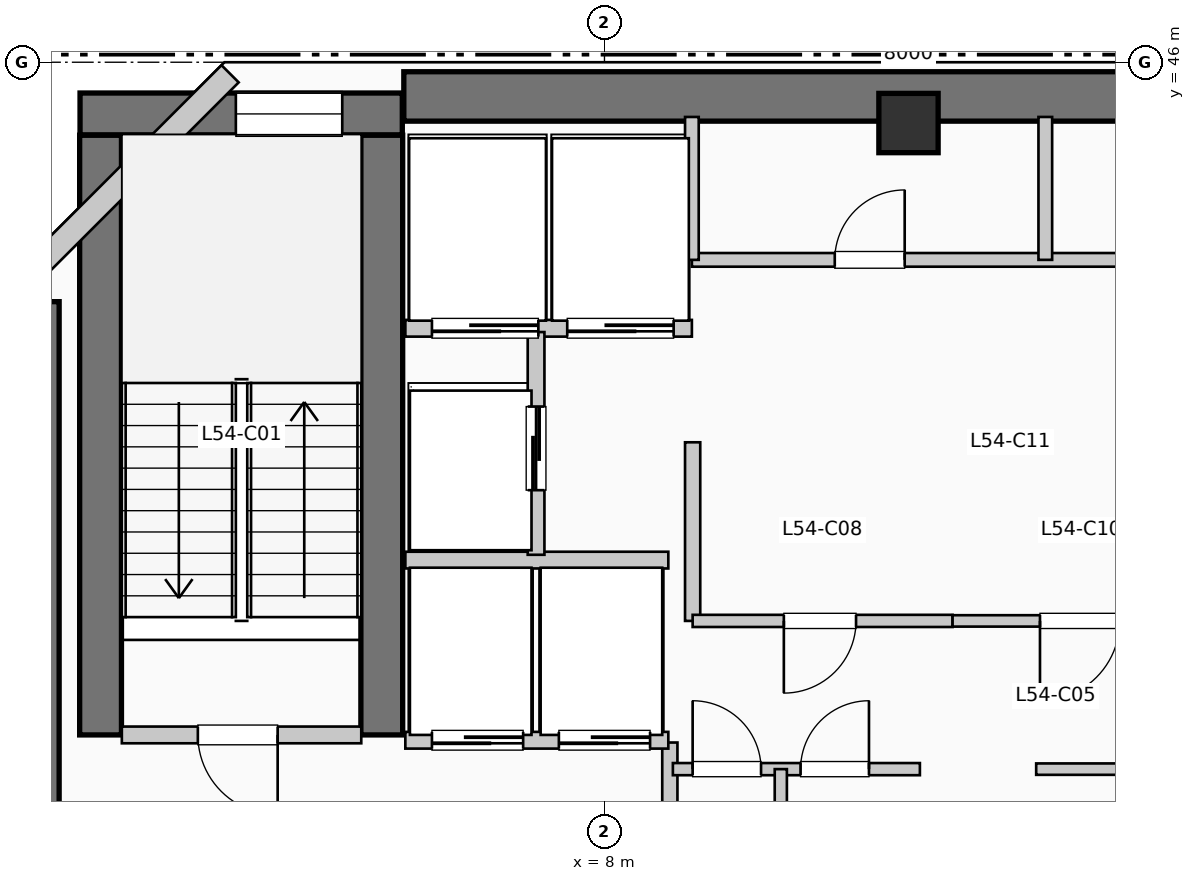
"""IFC4 building model, lengths in metres.
Left out: names, types, materials, properties, quantities, classifications, styles, units other than length and angle.
Written with IfcOpenShell. Run it as: python <this file> out.ifc"""

import sys

from ifc_helpers import new_model, si_unit, direction, frame, frame_2d, origin, origin_2d, place, context, subcontext, project, spatial, rectangle, extrude, element, fill, save


model = new_model("IFC4")
c1 = context("Model", 3, precision=1e-05, world=origin(), true_north=direction((0.0, 1.0)))
c2 = subcontext(c1, "Body", "Model", "MODEL_VIEW")
j1 = project(units=[si_unit("LENGTHUNIT", "METRE"), si_unit("PLANEANGLEUNIT", "RADIAN")], contexts=[c1])
p1 = place(None, origin())
s1 = spatial("IfcSite", under=j1, at=p1, CompositionType="ELEMENT")
p2 = place(p1, origin())
s2 = spatial("IfcBuilding", under=s1, at=p2, CompositionType="ELEMENT")
p3 = place(p2, frame((0.0, 0.0, 223.74)))
s3 = spatial("IfcBuildingStorey", under=s2, at=p3, CompositionType="ELEMENT", Elevation=223.74)
p4 = place(p3, frame((5.36, 45.55, 0.0), z_axis=(0.0, 0.0, 1.0), x_axis=(1.0, 0.0, 0.0)))
e1 = element("IfcWall", 1, at=p4, inside=s3, PredefinedType="SHEAR", context=c2, shape_type="SweptSolid", body=[
    extrude(rectangle(XDim=13.98, YDim=0.65, at=frame_2d((6.99, 0.0))), origin(), (0.0, 0.0, 1.0), 3.96),
])
p5 = place(p3, frame((0.5, 34.95, 0.0), z_axis=(0.0, 0.0, 1.0), x_axis=(0.0, 1.0, 0.0)))
e2 = element("IfcWall", 2, at=p5, inside=s3, PredefinedType="SHEAR", context=c2, shape_type="SweptSolid", body=[
    extrude(rectangle(XDim=7.9, YDim=0.65, at=frame_2d((3.95, 0.0))), origin(), (0.0, 0.0, 1.0), 3.96),
])
for number, where, z_axis, x_axis in (
    (3, (1.37, 37.15, 0.0), (0.0, 0.0, 1.0), (0.0, 1.0, 0.0)),
    (4, (5.07, 37.15, 0.0), (0.0, 0.0, 1.0), (0.0, 1.0, 0.0)),
):
    element("IfcWall", number, at=place(p3, frame(where, z_axis=z_axis, x_axis=x_axis)), inside=s3, PredefinedType="SHEAR", context=c2, shape_type="SweptSolid", body=[
        extrude(rectangle(XDim=7.89, YDim=0.55, at=frame_2d((3.945, 0.0))), origin(), (0.0, 0.0, 1.0), 3.96),
    ])
p6 = place(p3, frame((1.1, 45.32, 0.0), z_axis=(0.0, 0.0, 1.0), x_axis=(1.0, 0.0, 0.0)))
e5 = element("IfcWall", 5, at=p6, inside=s3, PredefinedType="SHEAR", context=c2, shape_type="SweptSolid", body=[
    extrude(rectangle(XDim=4.24, YDim=0.55, at=frame_2d((2.12, 0.0))), origin(), (0.0, 0.0, 1.0), 3.96),
])
p7 = place(p6, frame((2.05, 0.0, 1.05)))
e6 = element("IfcOpeningElement", 6, at=p7, cuts=e5, PredefinedType="OPENING", context=c2, shape_type="SweptSolid", body=[
    extrude(rectangle(XDim=1.4, YDim=1.8, at=frame_2d((0.7, 0.9))), frame((0.0, 0.285, 0.0), z_axis=(0.0, -1.0, 0.0), x_axis=(1.0, 0.0, 0.0)), (0.0, 0.0, 1.0), 0.57),
])
p8 = place(p3, frame((12.0, 45.2, 0.0), z_axis=(0.0, 0.0, 1.0), x_axis=(1.0, 0.0, 0.0)))
e7 = element("IfcColumn", 7, at=p8, inside=s3, PredefinedType="COLUMN", context=c2, shape_type="SweptSolid", body=[
    extrude(rectangle(XDim=0.78, YDim=0.78, at=origin_2d()), origin(), (0.0, 0.0, 1.0), 3.96),
])
p9 = place(p3, frame((3.074, 45.848, 0.0), z_axis=(0.0, 0.0, 1.0), x_axis=(-0.707106781187, -0.707106781187, 0.0)))
e8 = element("IfcWall", 8, at=p9, inside=s3, PredefinedType="SOLIDWALL", context=c2, shape_type="SweptSolid", body=[
    extrude(rectangle(XDim=4.133, YDim=0.32, at=frame_2d((2.066, 0.0))), origin(), (0.0, 0.0, 1.0), 3.71),
])
p10 = place(p3, frame((1.65, 37.15, 0.0), z_axis=(0.0, 0.0, 1.0), x_axis=(1.0, 0.0, 0.0)))
e9 = element("IfcWall", 9, at=p10, inside=s3, PredefinedType="PARTITIONING", context=c2, shape_type="SweptSolid", body=[
    extrude(rectangle(XDim=3.15, YDim=0.22, at=frame_2d((1.575, 0.0))), origin(), (0.0, 0.0, 1.0), 3.71),
])
p11 = place(p10, frame((2.05, 0.0, 0.0), z_axis=(0.0, 0.0, 1.0), x_axis=(-1.0, 0.0, 0.0)))
e10 = element("IfcOpeningElement", 10, at=p11, cuts=e9, PredefinedType="OPENING", context=c2, shape_type="SweptSolid", body=[
    extrude(rectangle(XDim=1.05, YDim=2.15, at=frame_2d((0.525, 1.075))), frame((0.0, 0.12, 0.0), z_axis=(0.0, -1.0, 0.0), x_axis=(1.0, 0.0, 0.0)), (0.0, 0.0, 1.0), 0.24),
])
p12 = place(p3, frame((8.86, 34.55, 0.0), z_axis=(0.0, 0.0, 1.0), x_axis=(0.0, 1.0, 0.0)))
e11 = element("IfcWall", 11, at=p12, inside=s3, PredefinedType="PARTITIONING", context=c2, shape_type="SweptSolid", body=[
    extrude(rectangle(XDim=2.5, YDim=0.2, at=frame_2d((1.25, 0.0))), origin(), (0.0, 0.0, 1.0), 3.71),
])
p13 = place(p3, frame((5.38, 37.08, 0.0), z_axis=(0.0, 0.0, 1.0), x_axis=(1.0, 0.0, 0.0)))
e12 = element("IfcWall", 12, at=p13, inside=s3, PredefinedType="PARTITIONING", context=c2, shape_type="SweptSolid", body=[
    extrude(rectangle(XDim=3.46, YDim=0.22, at=frame_2d((1.73, 0.0))), origin(), (0.0, 0.0, 1.0), 3.71),
])
p14 = place(p13, frame((1.55, 0.0, 0.0), z_axis=(0.0, 0.0, 1.0), x_axis=(-1.0, 0.0, 0.0)))
e13 = element("IfcOpeningElement", 13, at=p14, cuts=e12, PredefinedType="OPENING", context=c2, shape_type="SweptSolid", body=[
    extrude(rectangle(XDim=1.2, YDim=2.2, at=frame_2d((0.6, 1.1))), frame((0.0, 0.12, 0.0), z_axis=(0.0, -1.0, 0.0), x_axis=(1.0, 0.0, 0.0)), (0.0, 0.0, 1.0), 0.24),
])
p15 = place(p13, frame((3.22, 0.0, 0.0), z_axis=(0.0, 0.0, 1.0), x_axis=(-1.0, 0.0, 0.0)))
e14 = element("IfcOpeningElement", 14, at=p15, cuts=e12, PredefinedType="OPENING", context=c2, shape_type="SweptSolid", body=[
    extrude(rectangle(XDim=1.2, YDim=2.2, at=frame_2d((0.6, 1.1))), frame((0.0, 0.12, 0.0), z_axis=(0.0, -1.0, 0.0), x_axis=(1.0, 0.0, 0.0)), (0.0, 0.0, 1.0), 0.24),
])
p16 = place(p3, frame((5.38, 39.45, 0.0), z_axis=(0.0, 0.0, 1.0), x_axis=(1.0, 0.0, 0.0)))
e15 = element("IfcWall", 15, at=p16, inside=s3, PredefinedType="PARTITIONING", context=c2, shape_type="SweptSolid", body=[
    extrude(rectangle(XDim=3.46, YDim=0.22, at=frame_2d((1.73, 0.0))), origin(), (0.0, 0.0, 1.0), 3.71),
])
p17 = place(p3, frame((5.38, 42.5, 0.0), z_axis=(0.0, 0.0, 1.0), x_axis=(1.0, 0.0, 0.0)))
e16 = element("IfcWall", 16, at=p17, inside=s3, PredefinedType="PARTITIONING", context=c2, shape_type="SweptSolid", body=[
    extrude(rectangle(XDim=3.77, YDim=0.22, at=frame_2d((1.885, 0.0))), origin(), (0.0, 0.0, 1.0), 3.71),
])
p18 = place(p17, frame((1.75, 0.0, 0.0), z_axis=(0.0, 0.0, 1.0), x_axis=(-1.0, 0.0, 0.0)))
e17 = element("IfcOpeningElement", 17, at=p18, cuts=e16, PredefinedType="OPENING", context=c2, shape_type="SweptSolid", body=[
    extrude(rectangle(XDim=1.4, YDim=2.2, at=frame_2d((0.7, 1.1))), frame((0.0, 0.12, 0.0), z_axis=(0.0, -1.0, 0.0), x_axis=(1.0, 0.0, 0.0)), (0.0, 0.0, 1.0), 0.24),
])
p19 = place(p17, frame((3.53, 0.0, 0.0), z_axis=(0.0, 0.0, 1.0), x_axis=(-1.0, 0.0, 0.0)))
e18 = element("IfcOpeningElement", 18, at=p19, cuts=e16, PredefinedType="OPENING", context=c2, shape_type="SweptSolid", body=[
    extrude(rectangle(XDim=1.4, YDim=2.2, at=frame_2d((0.7, 1.1))), frame((0.0, 0.12, 0.0), z_axis=(0.0, -1.0, 0.0), x_axis=(1.0, 0.0, 0.0)), (0.0, 0.0, 1.0), 0.24),
])
p20 = place(p3, frame((7.1, 39.52, 0.0), z_axis=(0.0, 0.0, 1.0), x_axis=(0.0, 1.0, 0.0)))
e19 = element("IfcWall", 19, at=p20, inside=s3, PredefinedType="PARTITIONING", context=c2, shape_type="SweptSolid", body=[
    extrude(rectangle(XDim=2.93, YDim=0.22, at=frame_2d((1.465, 0.0))), origin(), (0.0, 0.0, 1.0), 3.71),
])
p21 = place(p20, frame((0.85, 0.0, 0.0)))
e20 = element("IfcOpeningElement", 20, at=p21, cuts=e19, PredefinedType="OPENING", context=c2, shape_type="SweptSolid", body=[
    extrude(rectangle(XDim=1.1, YDim=2.2, at=frame_2d((0.55, 1.1))), frame((0.0, 0.12, 0.0), z_axis=(0.0, -1.0, 0.0), x_axis=(1.0, 0.0, 0.0)), (0.0, 0.0, 1.0), 0.24),
])
p22 = place(p3, frame((9.16, 38.65, 0.0), z_axis=(0.0, 0.0, 1.0), x_axis=(0.0, 1.0, 0.0)))
e21 = element("IfcWall", 21, at=p22, inside=s3, PredefinedType="PARTITIONING", context=c2, shape_type="SweptSolid", body=[
    extrude(rectangle(XDim=2.35, YDim=0.2, at=frame_2d((1.175, 0.0))), origin(), (0.0, 0.0, 1.0), 3.71),
])
p23 = place(p3, frame((8.9, 36.7, 0.0), z_axis=(0.0, 0.0, 1.0), x_axis=(1.0, 0.0, 0.0)))
e22 = element("IfcWall", 22, at=p23, inside=s3, PredefinedType="PARTITIONING", context=c2, shape_type="SweptSolid", body=[
    extrude(rectangle(XDim=3.25, YDim=0.16, at=frame_2d((1.625, 0.0))), origin(), (0.0, 0.0, 1.0), 3.71),
])
p24 = place(p23, frame((0.26, 0.0, 0.0)))
e23 = element("IfcOpeningElement", 23, at=p24, cuts=e22, PredefinedType="OPENING", context=c2, shape_type="SweptSolid", body=[
    extrude(rectangle(XDim=0.9, YDim=2.15, at=frame_2d((0.45, 1.075))), frame((0.0, 0.09, 0.0), z_axis=(0.0, -1.0, 0.0), x_axis=(1.0, 0.0, 0.0)), (0.0, 0.0, 1.0), 0.18),
])
p25 = place(p23, frame((1.68, 0.0, 0.0)))
e24 = element("IfcOpeningElement", 24, at=p25, cuts=e22, PredefinedType="OPENING", context=c2, shape_type="SweptSolid", body=[
    extrude(rectangle(XDim=0.9, YDim=2.15, at=frame_2d((0.45, 1.075))), frame((0.0, 0.09, 0.0), z_axis=(0.0, -1.0, 0.0), x_axis=(1.0, 0.0, 0.0)), (0.0, 0.0, 1.0), 0.18),
])
p26 = place(p3, frame((10.32, 34.55, 0.0), z_axis=(0.0, 0.0, 1.0), x_axis=(0.0, 1.0, 0.0)))
e25 = element("IfcWall", 25, at=p26, inside=s3, PredefinedType="PARTITIONING", context=c2, shape_type="SweptSolid", body=[
    extrude(rectangle(XDim=2.15, YDim=0.16, at=frame_2d((1.075, 0.0))), origin(), (0.0, 0.0, 1.0), 3.71),
])
p27 = place(p3, frame((9.16, 38.65, 0.0), z_axis=(0.0, 0.0, 1.0), x_axis=(1.0, 0.0, 0.0)))
e26 = element("IfcWall", 26, at=p27, inside=s3, PredefinedType="PARTITIONING", context=c2, shape_type="SweptSolid", body=[
    extrude(rectangle(XDim=3.42, YDim=0.16, at=frame_2d((1.71, 0.0))), origin(), (0.0, 0.0, 1.0), 3.71),
])
p28 = place(p27, frame((2.15, 0.0, 0.0), z_axis=(0.0, 0.0, 1.0), x_axis=(-1.0, 0.0, 0.0)))
e27 = element("IfcOpeningElement", 27, at=p28, cuts=e26, PredefinedType="OPENING", context=c2, shape_type="SweptSolid", body=[
    extrude(rectangle(XDim=0.95, YDim=2.15, at=frame_2d((0.475, 1.075))), frame((0.0, 0.09, 0.0), z_axis=(0.0, -1.0, 0.0), x_axis=(1.0, 0.0, 0.0)), (0.0, 0.0, 1.0), 0.18),
])
p29 = place(p3, frame((13.68, 36.7, 0.0), z_axis=(0.0, 0.0, 1.0), x_axis=(1.0, 0.0, 0.0)))
e28 = element("IfcWall", 28, at=p29, inside=s3, PredefinedType="PARTITIONING", context=c2, shape_type="SweptSolid", body=[
    extrude(rectangle(XDim=3.28, YDim=0.15, at=frame_2d((1.64, 0.0))), origin(), (0.0, 0.0, 1.0), 3.71),
])
p30 = place(p29, frame((1.15, 0.0, 0.0)))
e29 = element("IfcOpeningElement", 29, at=p30, cuts=e28, PredefinedType="OPENING", context=c2, shape_type="SweptSolid", body=[
    extrude(rectangle(XDim=0.95, YDim=2.15, at=frame_2d((0.475, 1.075))), frame((0.0, 0.085, 0.0), z_axis=(0.0, -1.0, 0.0), x_axis=(1.0, 0.0, 0.0)), (0.0, 0.0, 1.0), 0.17),
])
p31 = place(p3, frame((12.58, 38.65, 0.0), z_axis=(0.0, 0.0, 1.0), x_axis=(1.0, 0.0, 0.0)))
e30 = element("IfcWall", 30, at=p31, inside=s3, PredefinedType="PARTITIONING", context=c2, shape_type="SweptSolid", body=[
    extrude(rectangle(XDim=3.38, YDim=0.15, at=frame_2d((1.69, 0.0))), origin(), (0.0, 0.0, 1.0), 3.71),
])
p32 = place(p31, frame((2.2, 0.0, 0.0), z_axis=(0.0, 0.0, 1.0), x_axis=(-1.0, 0.0, 0.0)))
e31 = element("IfcOpeningElement", 31, at=p32, cuts=e30, PredefinedType="OPENING", context=c2, shape_type="SweptSolid", body=[
    extrude(rectangle(XDim=1.05, YDim=2.15, at=frame_2d((0.525, 1.075))), frame((0.0, 0.085, 0.0), z_axis=(0.0, -1.0, 0.0), x_axis=(1.0, 0.0, 0.0)), (0.0, 0.0, 1.0), 0.17),
])
p33 = place(p3, frame((9.15, 43.4, 0.0), z_axis=(0.0, 0.0, 1.0), x_axis=(1.0, 0.0, 0.0)))
e32 = element("IfcWall", 32, at=p33, inside=s3, PredefinedType="PLUMBINGWALL", context=c2, shape_type="SweptSolid", body=[
    extrude(rectangle(XDim=9.33, YDim=0.18, at=frame_2d((4.665, 0.0))), origin(), (0.0, 0.0, 1.0), 3.71),
])
p34 = place(p33, frame((1.88, 0.0, 0.0)))
e33 = element("IfcOpeningElement", 33, at=p34, cuts=e32, PredefinedType="OPENING", context=c2, shape_type="SweptSolid", body=[
    extrude(rectangle(XDim=0.92, YDim=2.1, at=frame_2d((0.46, 1.05))), frame((0.0, 0.1, 0.0), z_axis=(0.0, -1.0, 0.0), x_axis=(1.0, 0.0, 0.0)), (0.0, 0.0, 1.0), 0.2),
])
p35 = place(p33, frame((6.515, 0.0, 0.0)))
e34 = element("IfcOpeningElement", 34, at=p35, cuts=e32, PredefinedType="OPENING", context=c2, shape_type="SweptSolid", body=[
    extrude(rectangle(XDim=0.92, YDim=2.1, at=frame_2d((0.46, 1.05))), frame((0.0, 0.1, 0.0), z_axis=(0.0, -1.0, 0.0), x_axis=(1.0, 0.0, 0.0)), (0.0, 0.0, 1.0), 0.2),
])
for number, where, z_axis, x_axis in (
    (35, (9.15, 43.4, 0.0), (0.0, 0.0, 1.0), (0.0, 1.0, 0.0)),
    (36, (13.8, 43.4, 0.0), (0.0, 0.0, 1.0), (0.0, 1.0, 0.0)),
):
    element("IfcWall", number, at=place(p3, frame(where, z_axis=z_axis, x_axis=x_axis)), inside=s3, PredefinedType="PLUMBINGWALL", context=c2, shape_type="SweptSolid", body=[
        extrude(rectangle(XDim=1.88, YDim=0.18, at=frame_2d((0.94, 0.0))), origin(), (0.0, 0.0, 1.0), 3.71),
    ])
p36 = place(p7, origin())
e37 = element("IfcWindow", 37, at=p36, inside=s3, PartitioningType="SINGLE_PANEL", PredefinedType="WINDOW", context=c2, shape_type="SweptSolid", body=[
    extrude(rectangle(XDim=1.4, YDim=1.8, at=frame_2d((0.7, 0.9))), frame((0.0, 0.03, 0.0), z_axis=(0.0, -1.0, 0.0), x_axis=(1.0, 0.0, 0.0)), (0.0, 0.0, 1.0), 0.06),
])
fill(e6, e37)
p37 = place(p11, origin())
e38 = element("IfcDoor", 38, at=p37, inside=s3, OperationType="SINGLE_SWING_RIGHT", PredefinedType="DOOR", context=c2, shape_type="SweptSolid", body=[
    extrude(rectangle(XDim=1.05, YDim=2.15, at=frame_2d((0.525, 1.075))), frame((0.0, 0.025, 0.0), z_axis=(0.0, -1.0, 0.0), x_axis=(1.0, 0.0, 0.0)), (0.0, 0.0, 1.0), 0.05),
])
fill(e10, e38)
p38 = place(p14, origin())
e39 = element("IfcDoor", 39, at=p38, inside=s3, OperationType="SLIDING_TO_RIGHT", PredefinedType="DOOR", context=c2, shape_type="SweptSolid", body=[
    extrude(rectangle(XDim=1.2, YDim=2.2, at=frame_2d((0.6, 1.1))), frame((0.0, 0.025, 0.0), z_axis=(0.0, -1.0, 0.0), x_axis=(1.0, 0.0, 0.0)), (0.0, 0.0, 1.0), 0.05),
])
fill(e13, e39)
p39 = place(p15, origin())
e40 = element("IfcDoor", 40, at=p39, inside=s3, OperationType="SLIDING_TO_RIGHT", PredefinedType="DOOR", context=c2, shape_type="SweptSolid", body=[
    extrude(rectangle(XDim=1.2, YDim=2.2, at=frame_2d((0.6, 1.1))), frame((0.0, 0.025, 0.0), z_axis=(0.0, -1.0, 0.0), x_axis=(1.0, 0.0, 0.0)), (0.0, 0.0, 1.0), 0.05),
])
fill(e14, e40)
p40 = place(p18, origin())
e41 = element("IfcDoor", 41, at=p40, inside=s3, OperationType="SLIDING_TO_LEFT", PredefinedType="DOOR", context=c2, shape_type="SweptSolid", body=[
    extrude(rectangle(XDim=1.4, YDim=2.2, at=frame_2d((0.7, 1.1))), frame((0.0, 0.025, 0.0), z_axis=(0.0, -1.0, 0.0), x_axis=(1.0, 0.0, 0.0)), (0.0, 0.0, 1.0), 0.05),
])
fill(e17, e41)
p41 = place(p19, origin())
e42 = element("IfcDoor", 42, at=p41, inside=s3, OperationType="SLIDING_TO_LEFT", PredefinedType="DOOR", context=c2, shape_type="SweptSolid", body=[
    extrude(rectangle(XDim=1.4, YDim=2.2, at=frame_2d((0.7, 1.1))), frame((0.0, 0.025, 0.0), z_axis=(0.0, -1.0, 0.0), x_axis=(1.0, 0.0, 0.0)), (0.0, 0.0, 1.0), 0.05),
])
fill(e18, e42)
p42 = place(p21, origin())
e43 = element("IfcDoor", 43, at=p42, inside=s3, OperationType="SLIDING_TO_LEFT", PredefinedType="DOOR", context=c2, shape_type="SweptSolid", body=[
    extrude(rectangle(XDim=1.1, YDim=2.2, at=frame_2d((0.55, 1.1))), frame((0.0, 0.025, 0.0), z_axis=(0.0, -1.0, 0.0), x_axis=(1.0, 0.0, 0.0)), (0.0, 0.0, 1.0), 0.05),
])
fill(e20, e43)
p43 = place(p24, origin())
e44 = element("IfcDoor", 44, at=p43, inside=s3, OperationType="SINGLE_SWING_LEFT", PredefinedType="DOOR", context=c2, shape_type="SweptSolid", body=[
    extrude(rectangle(XDim=0.9, YDim=2.15, at=frame_2d((0.45, 1.075))), frame((0.0, 0.025, 0.0), z_axis=(0.0, -1.0, 0.0), x_axis=(1.0, 0.0, 0.0)), (0.0, 0.0, 1.0), 0.05),
])
fill(e23, e44)
p44 = place(p25, origin())
e45 = element("IfcDoor", 45, at=p44, inside=s3, OperationType="SINGLE_SWING_RIGHT", PredefinedType="DOOR", context=c2, shape_type="SweptSolid", body=[
    extrude(rectangle(XDim=0.9, YDim=2.15, at=frame_2d((0.45, 1.075))), frame((0.0, 0.025, 0.0), z_axis=(0.0, -1.0, 0.0), x_axis=(1.0, 0.0, 0.0)), (0.0, 0.0, 1.0), 0.05),
])
fill(e24, e45)
p45 = place(p28, origin())
e46 = element("IfcDoor", 46, at=p45, inside=s3, OperationType="SINGLE_SWING_LEFT", PredefinedType="DOOR", context=c2, shape_type="SweptSolid", body=[
    extrude(rectangle(XDim=0.95, YDim=2.15, at=frame_2d((0.475, 1.075))), frame((0.0, 0.025, 0.0), z_axis=(0.0, -1.0, 0.0), x_axis=(1.0, 0.0, 0.0)), (0.0, 0.0, 1.0), 0.05),
])
fill(e27, e46)
p46 = place(p32, origin())
e47 = element("IfcDoor", 47, at=p46, inside=s3, OperationType="SINGLE_SWING_LEFT", PredefinedType="DOOR", context=c2, shape_type="SweptSolid", body=[
    extrude(rectangle(XDim=1.05, YDim=2.15, at=frame_2d((0.525, 1.075))), frame((0.0, 0.025, 0.0), z_axis=(0.0, -1.0, 0.0), x_axis=(1.0, 0.0, 0.0)), (0.0, 0.0, 1.0), 0.05),
])
fill(e31, e47)
p47 = place(p34, origin())
e48 = element("IfcDoor", 48, at=p47, inside=s3, OperationType="SINGLE_SWING_RIGHT", PredefinedType="DOOR", context=c2, shape_type="SweptSolid", body=[
    extrude(rectangle(XDim=0.92, YDim=2.1, at=frame_2d((0.46, 1.05))), frame((0.0, 0.025, 0.0), z_axis=(0.0, -1.0, 0.0), x_axis=(1.0, 0.0, 0.0)), (0.0, 0.0, 1.0), 0.05),
])
fill(e33, e48)
save(model, sys.argv[1])
